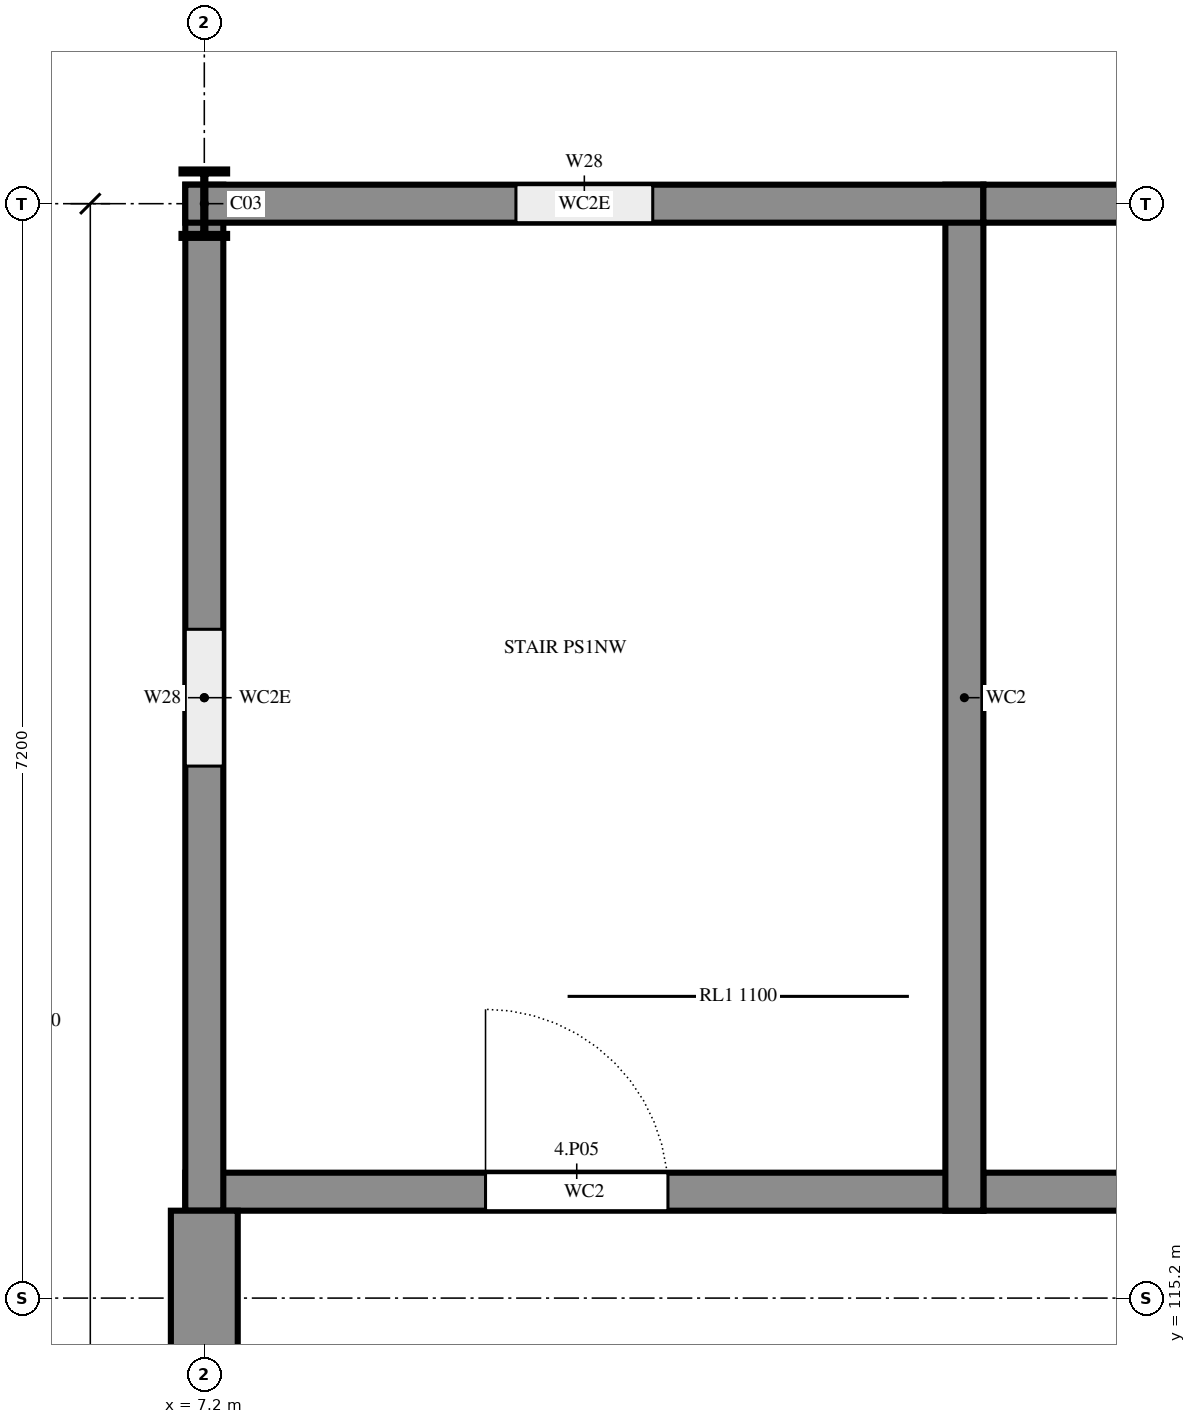
"""IFC4 building model, lengths in metres.
Left out: names, types, materials, properties, quantities, classifications, styles, units other than length and angle.
Written with IfcOpenShell. Run it as: python <this file> out.ifc"""

import sys

from ifc_helpers import new_model, si_unit, direction, frame, frame_2d, origin, origin_2d, place, context, subcontext, project, spatial, rectangle, i_section, extrude, element, fill, save


model = new_model("IFC4")
c1 = context("Model", 3, precision=1e-05, world=origin(), true_north=direction((0.0, 1.0)))
c2 = subcontext(c1, "Body", "Model", "MODEL_VIEW")
j1 = project(units=[si_unit("LENGTHUNIT", "METRE"), si_unit("PLANEANGLEUNIT", "RADIAN")], contexts=[c1])
p1 = place(None, origin())
s1 = spatial("IfcSite", under=j1, at=p1, CompositionType="ELEMENT")
p2 = place(p1, origin())
s2 = spatial("IfcBuilding", under=s1, at=p2, CompositionType="ELEMENT")
p3 = place(p2, frame((0.0, 0.0, 14.4)))
s3 = spatial("IfcBuildingStorey", under=s2, at=p3, CompositionType="ELEMENT", Elevation=14.4)
p4 = place(p3, frame((7.2, 122.4, 0.0), z_axis=(0.0, 0.0, 1.0), x_axis=(1.0, 0.0, 0.0)))
e1 = element("IfcColumn", 1, at=p4, inside=s3, PredefinedType="COLUMN", context=c2, shape_type="SweptSolid", body=[
    extrude(i_section(OverallWidth=0.3, OverallDepth=0.45, WebThickness=0.014, FlangeThickness=0.026, FilletRadius=0.027, at=origin_2d()), origin(), (0.0, 0.0, 1.0), 3.6),
])
p5 = place(p3, frame((7.075, 115.9, 0.0), z_axis=(0.0, 0.0, 1.0), x_axis=(1.0, 0.0, 0.0)))
e2 = element("IfcWall", 2, at=p5, inside=s3, PredefinedType="SHEAR", context=c2, shape_type="SweptSolid", body=[
    extrude(rectangle(XDim=5.25, YDim=0.25, at=frame_2d((2.625, 0.0))), origin(), (0.0, 0.0, 1.0), 3.6),
])
p6 = place(p5, frame((1.975, 0.0, 0.0)))
e3 = element("IfcOpeningElement", 3, at=p6, cuts=e2, PredefinedType="OPENING", context=c2, shape_type="SweptSolid", body=[
    extrude(rectangle(XDim=1.2, YDim=2.4, at=frame_2d((0.6, 1.2))), frame((0.0, 0.135, 0.0), z_axis=(0.0, -1.0, 0.0), x_axis=(1.0, 0.0, 0.0)), (0.0, 0.0, 1.0), 0.27),
])
p7 = place(p3, frame((12.325, 115.9, 0.0), z_axis=(0.0, 0.0, 1.0), x_axis=(1.0, 0.0, 0.0)))
e4 = element("IfcWall", 4, at=p7, inside=s3, PredefinedType="SHEAR", context=c2, shape_type="SweptSolid", body=[
    extrude(rectangle(XDim=5.0, YDim=0.25, at=frame_2d((2.5, 0.0))), origin(), (0.0, 0.0, 1.0), 3.6),
])
p8 = place(p7, frame((1.75, 0.0, 0.0)))
e5 = element("IfcOpeningElement", 5, at=p8, cuts=e4, PredefinedType="OPENING", context=c2, shape_type="SweptSolid", body=[
    extrude(rectangle(XDim=1.2, YDim=2.4, at=frame_2d((0.6, 1.2))), frame((0.0, 0.135, 0.0), z_axis=(0.0, -1.0, 0.0), x_axis=(1.0, 0.0, 0.0)), (0.0, 0.0, 1.0), 0.27),
])
p9 = place(p3, frame((12.2, 115.775, 0.0), z_axis=(0.0, 0.0, 1.0), x_axis=(0.0, 1.0, 0.0)))
e6 = element("IfcWall", 6, at=p9, inside=s3, PredefinedType="SHEAR", context=c2, shape_type="SweptSolid", body=[
    extrude(rectangle(XDim=6.75, YDim=0.25, at=frame_2d((3.375, 0.0))), origin(), (0.0, 0.0, 1.0), 3.6),
])
p10 = place(p3, frame((7.2, 122.525, 0.0), z_axis=(0.0, 0.0, 1.0), x_axis=(0.0, -1.0, 0.0)))
e7 = element("IfcWall", 7, at=p10, inside=s3, PredefinedType="SHEAR", context=c2, shape_type="SweptSolid", body=[
    extrude(rectangle(XDim=6.75, YDim=0.25, at=frame_2d((3.375, 0.0))), origin(), (0.0, 0.0, 1.0), 3.6),
])
p11 = place(p10, frame((2.925, 0.0, 0.6)))
e8 = element("IfcOpeningElement", 8, at=p11, cuts=e7, PredefinedType="OPENING", context=c2, shape_type="SweptSolid", body=[
    extrude(rectangle(XDim=0.9, YDim=2.1, at=frame_2d((0.45, 1.05))), frame((0.0, 0.135, 0.0), z_axis=(0.0, -1.0, 0.0), x_axis=(1.0, 0.0, 0.0)), (0.0, 0.0, 1.0), 0.27),
])
p12 = place(p3, frame((12.325, 122.4, 0.0), z_axis=(0.0, 0.0, 1.0), x_axis=(-1.0, 0.0, 0.0)))
e9 = element("IfcWall", 9, at=p12, inside=s3, PredefinedType="SHEAR", context=c2, shape_type="SweptSolid", body=[
    extrude(rectangle(XDim=5.25, YDim=0.25, at=frame_2d((2.625, 0.0))), origin(), (0.0, 0.0, 1.0), 3.6),
])
p13 = place(p12, frame((2.175, 0.0, 0.6)))
e10 = element("IfcOpeningElement", 10, at=p13, cuts=e9, PredefinedType="OPENING", context=c2, shape_type="SweptSolid", body=[
    extrude(rectangle(XDim=0.9, YDim=2.1, at=frame_2d((0.45, 1.05))), frame((0.0, 0.135, 0.0), z_axis=(0.0, -1.0, 0.0), x_axis=(1.0, 0.0, 0.0)), (0.0, 0.0, 1.0), 0.27),
])
p14 = place(p3, frame((17.325, 122.4, 0.0), z_axis=(0.0, 0.0, 1.0), x_axis=(-1.0, 0.0, 0.0)))
e11 = element("IfcWall", 11, at=p14, inside=s3, PredefinedType="SHEAR", context=c2, shape_type="SweptSolid", body=[
    extrude(rectangle(XDim=5.0, YDim=0.25, at=frame_2d((2.5, 0.0))), origin(), (0.0, 0.0, 1.0), 3.6),
])
p15 = place(p14, frame((2.175, 0.0, 0.6)))
e12 = element("IfcOpeningElement", 12, at=p15, cuts=e11, PredefinedType="OPENING", context=c2, shape_type="SweptSolid", body=[
    extrude(rectangle(XDim=0.9, YDim=2.1, at=frame_2d((0.45, 1.05))), frame((0.0, 0.135, 0.0), z_axis=(0.0, -1.0, 0.0), x_axis=(1.0, 0.0, 0.0)), (0.0, 0.0, 1.0), 0.27),
])
p16 = place(p3, frame((7.2, 115.775, 0.0), z_axis=(0.0, 0.0, 1.0), x_axis=(0.0, -1.0, 0.0)))
e13 = element("IfcWall", 13, at=p16, inside=s3, PredefinedType="SOLIDWALL", context=c2, shape_type="SweptSolid", body=[
    extrude(rectangle(XDim=7.55, YDim=0.44, at=frame_2d((3.775, 0.0))), origin(), (0.0, 0.0, 1.0), 3.09),
])
p17 = place(p16, frame((5.075, 0.0, 0.75)))
e14 = element("IfcOpeningElement", 14, at=p17, cuts=e13, PredefinedType="OPENING", context=c2, shape_type="SweptSolid", body=[
    extrude(rectangle(XDim=1.8, YDim=1.8, at=frame_2d((0.9, 0.9))), frame((0.0, 0.23, 0.0), z_axis=(0.0, -1.0, 0.0), x_axis=(1.0, 0.0, 0.0)), (0.0, 0.0, 1.0), 0.46),
])
p18 = place(p13, origin())
e15 = element("IfcWindow", 15, at=p18, inside=s3, PartitioningType="SINGLE_PANEL", PredefinedType="WINDOW", context=c2, shape_type="SweptSolid", body=[
    extrude(rectangle(XDim=0.9, YDim=2.1, at=frame_2d((0.45, 1.05))), frame((0.0, 0.03, 0.0), z_axis=(0.0, -1.0, 0.0), x_axis=(1.0, 0.0, 0.0)), (0.0, 0.0, 1.0), 0.06),
])
fill(e10, e15)
p19 = place(p11, origin())
e16 = element("IfcWindow", 16, at=p19, inside=s3, PartitioningType="SINGLE_PANEL", PredefinedType="WINDOW", context=c2, shape_type="SweptSolid", body=[
    extrude(rectangle(XDim=0.9, YDim=2.1, at=frame_2d((0.45, 1.05))), frame((0.0, 0.03, 0.0), z_axis=(0.0, -1.0, 0.0), x_axis=(1.0, 0.0, 0.0)), (0.0, 0.0, 1.0), 0.06),
])
fill(e8, e16)
p20 = place(p6, origin())
e17 = element("IfcDoor", 17, at=p20, inside=s3, OperationType="SINGLE_SWING_RIGHT", PredefinedType="DOOR", context=c2, shape_type="SweptSolid", body=[
    extrude(rectangle(XDim=1.2, YDim=2.4, at=frame_2d((0.6, 1.2))), frame((0.0, 0.025, 0.0), z_axis=(0.0, -1.0, 0.0), x_axis=(1.0, 0.0, 0.0)), (0.0, 0.0, 1.0), 0.05),
])
fill(e3, e17)
save(model, sys.argv[1])
